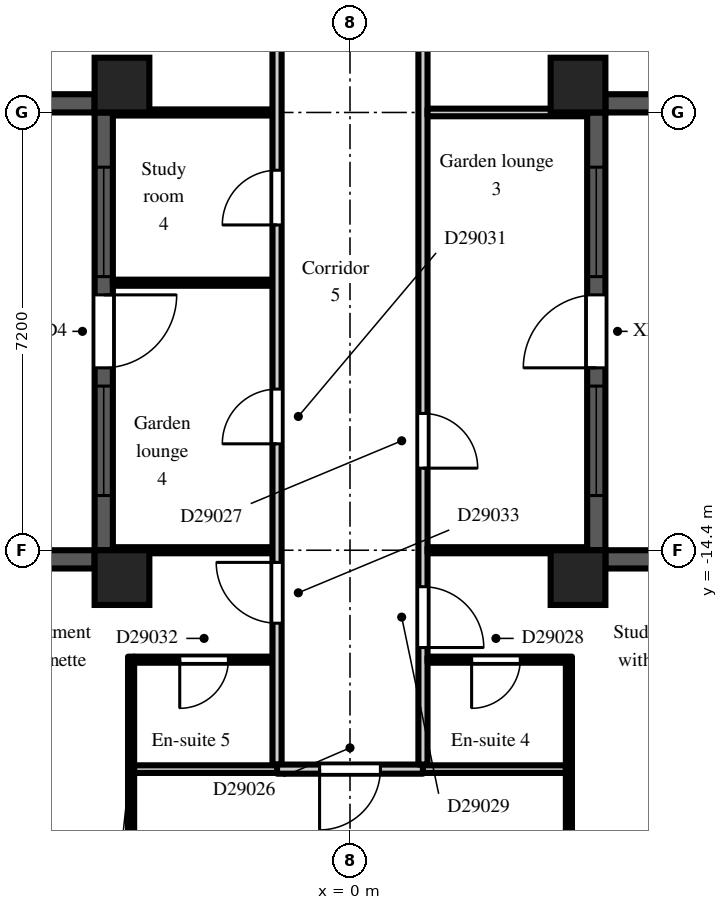
"""IFC4 building model, lengths in metres.
Left out: names, types, materials, properties, quantities, classifications, styles, units other than length and angle.
Written with IfcOpenShell. Run it as: python <this file> out.ifc"""

import sys

from ifc_helpers import new_model, si_unit, direction, frame, frame_2d, origin, origin_2d, place, context, subcontext, project, spatial, rectangle, extrude, element, fill, save


model = new_model("IFC4")
c1 = context("Model", 3, precision=1e-05, world=origin(), true_north=direction((0.0, 1.0)))
c2 = subcontext(c1, "Body", "Model", "MODEL_VIEW")
j1 = project(units=[si_unit("LENGTHUNIT", "METRE"), si_unit("PLANEANGLEUNIT", "RADIAN")], contexts=[c1])
p1 = place(None, origin())
s1 = spatial("IfcSite", under=j1, at=p1, CompositionType="ELEMENT")
p2 = place(p1, origin())
s2 = spatial("IfcBuilding", under=s1, at=p2, CompositionType="ELEMENT")
p3 = place(p2, frame((0.0, 0.0, 201.9)))
s3 = spatial("IfcBuildingStorey", under=s2, at=p3, CompositionType="ELEMENT", Elevation=201.9)
for number, where, z_axis, x_axis in (
    (1, (-3.75, -14.85, 0.0), (0.0, 0.0, 1.0), (1.0, 0.0, 0.0)),
    (2, (-3.75, -6.75, 0.0), (0.0, 0.0, 1.0), (1.0, 0.0, 0.0)),
    (3, (3.75, -14.85, 0.0), (0.0, 0.0, 1.0), (1.0, 0.0, 0.0)),
    (4, (3.75, -6.75, 0.0), (0.0, 0.0, 1.0), (1.0, 0.0, 0.0)),
):
    element("IfcColumn", number, at=place(p3, frame(where, z_axis=z_axis, x_axis=x_axis)), inside=s3, PredefinedType="COLUMN", context=c2, shape_type="SweptSolid", body=[
        extrude(rectangle(XDim=0.9, YDim=0.9, at=origin_2d()), origin(), (0.0, 0.0, 1.0), 3.0),
    ])
p4 = place(p3, frame((-7.2, -7.05, 0.0), z_axis=(0.0, 0.0, 1.0), x_axis=(1.0, 0.0, 0.0)))
e5 = element("IfcWall", 5, at=p4, inside=s3, PredefinedType="SOLIDWALL", context=c2, shape_type="SweptSolid", body=[
    extrude(rectangle(XDim=3.0, YDim=0.3, at=frame_2d((1.5, 0.0))), origin(), (0.0, 0.0, 1.0), 2.3),
])
p5 = place(p3, frame((-4.05, -7.2, 0.0), z_axis=(0.0, 0.0, 1.0), x_axis=(0.0, -1.0, 0.0)))
e6 = element("IfcWall", 6, at=p5, inside=s3, PredefinedType="SOLIDWALL", context=c2, shape_type="SweptSolid", body=[
    extrude(rectangle(XDim=7.2, YDim=0.3, at=frame_2d((3.6, 0.0))), origin(), (0.0, 0.0, 1.0), 2.3),
])
p6 = place(p5, frame((3.0, 0.0, 0.0)))
e7 = element("IfcOpeningElement", 7, at=p6, cuts=e6, PredefinedType="OPENING", context=c2, shape_type="SweptSolid", body=[
    extrude(rectangle(XDim=1.2, YDim=2.05, at=frame_2d((0.6, 1.025))), frame((0.0, 0.16, 0.0), z_axis=(0.0, -1.0, 0.0), x_axis=(1.0, 0.0, 0.0)), (0.0, 0.0, 1.0), 0.32),
])
p7 = place(p5, frame((0.9, 0.0, 0.2)))
e8 = element("IfcOpeningElement", 8, at=p7, cuts=e6, PredefinedType="OPENING", context=c2, shape_type="SweptSolid", body=[
    extrude(rectangle(XDim=1.8, YDim=1.85, at=frame_2d((0.9, 0.925))), frame((0.0, 0.16, 0.0), z_axis=(0.0, -1.0, 0.0), x_axis=(1.0, 0.0, 0.0)), (0.0, 0.0, 1.0), 0.32),
])
p8 = place(p5, frame((4.5, 0.0, 0.2)))
e9 = element("IfcOpeningElement", 9, at=p8, cuts=e6, PredefinedType="OPENING", context=c2, shape_type="SweptSolid", body=[
    extrude(rectangle(XDim=1.8, YDim=1.85, at=frame_2d((0.9, 0.925))), frame((0.0, 0.16, 0.0), z_axis=(0.0, -1.0, 0.0), x_axis=(1.0, 0.0, 0.0)), (0.0, 0.0, 1.0), 0.32),
])
for number, where, z_axis, x_axis in (
    (10, (-4.2, -14.55, 0.0), (0.0, 0.0, 1.0), (-1.0, 0.0, 0.0)),
    (11, (6.3, -14.55, 0.0), (0.0, 0.0, 1.0), (-1.0, 0.0, 0.0)),
):
    element("IfcWall", number, at=place(p3, frame(where, z_axis=z_axis, x_axis=x_axis)), inside=s3, PredefinedType="SOLIDWALL", context=c2, shape_type="SweptSolid", body=[
        extrude(rectangle(XDim=2.1, YDim=0.3, at=frame_2d((1.05, 0.0))), origin(), (0.0, 0.0, 1.0), 2.3),
    ])
p9 = place(p3, frame((4.05, -14.4, 0.0), z_axis=(0.0, 0.0, 1.0), x_axis=(0.0, 1.0, 0.0)))
e12 = element("IfcWall", 12, at=p9, inside=s3, PredefinedType="SOLIDWALL", context=c2, shape_type="SweptSolid", body=[
    extrude(rectangle(XDim=7.2, YDim=0.3, at=frame_2d((3.6, 0.0))), origin(), (0.0, 0.0, 1.0), 2.3),
])
p10 = place(p9, frame((3.0, 0.0, 0.0)))
e13 = element("IfcOpeningElement", 13, at=p10, cuts=e12, PredefinedType="OPENING", context=c2, shape_type="SweptSolid", body=[
    extrude(rectangle(XDim=1.2, YDim=2.05, at=frame_2d((0.6, 1.025))), frame((0.0, 0.16, 0.0), z_axis=(0.0, -1.0, 0.0), x_axis=(1.0, 0.0, 0.0)), (0.0, 0.0, 1.0), 0.32),
])
p11 = place(p9, frame((0.9, 0.0, 0.2)))
e14 = element("IfcOpeningElement", 14, at=p11, cuts=e12, PredefinedType="OPENING", context=c2, shape_type="SweptSolid", body=[
    extrude(rectangle(XDim=1.8, YDim=1.85, at=frame_2d((0.9, 0.925))), frame((0.0, 0.16, 0.0), z_axis=(0.0, -1.0, 0.0), x_axis=(1.0, 0.0, 0.0)), (0.0, 0.0, 1.0), 0.32),
])
p12 = place(p9, frame((4.5, 0.0, 0.2)))
e15 = element("IfcOpeningElement", 15, at=p12, cuts=e12, PredefinedType="OPENING", context=c2, shape_type="SweptSolid", body=[
    extrude(rectangle(XDim=1.8, YDim=1.85, at=frame_2d((0.9, 0.925))), frame((0.0, 0.16, 0.0), z_axis=(0.0, -1.0, 0.0), x_axis=(1.0, 0.0, 0.0)), (0.0, 0.0, 1.0), 0.32),
])
p13 = place(p3, frame((4.2, -7.05, 0.0), z_axis=(0.0, 0.0, 1.0), x_axis=(1.0, 0.0, 0.0)))
e16 = element("IfcWall", 16, at=p13, inside=s3, PredefinedType="SOLIDWALL", context=c2, shape_type="SweptSolid", body=[
    extrude(rectangle(XDim=3.0, YDim=0.3, at=frame_2d((1.5, 0.0))), origin(), (0.0, 0.0, 1.0), 2.3),
])
for number, where, z_axis, x_axis in (
    (17, (-3.9, -14.4, 0.0), (0.0, 0.0, 1.0), (1.0, 0.0, 0.0)),
    (18, (-3.9, -10.0, 0.0), (0.0, 0.0, 1.0), (1.0, 0.0, 0.0)),
    (19, (-3.9, -7.2, 0.0), (0.0, 0.0, 1.0), (1.0, 0.0, 0.0)),
):
    element("IfcWall", number, at=place(p3, frame(where, z_axis=z_axis, x_axis=x_axis)), inside=s3, PredefinedType="PARTITIONING", context=c2, shape_type="SweptSolid", body=[
        extrude(rectangle(XDim=2.625, YDim=0.1, at=frame_2d((1.312, 0.0))), origin(), (0.0, 0.0, 1.0), 2.6),
    ])
p14 = place(p3, frame((-3.6, -19.5, 0.0), z_axis=(0.0, 0.0, 1.0), x_axis=(0.0, 1.0, 0.0)))
e20 = element("IfcWall", 20, at=p14, inside=s3, PredefinedType="PARTITIONING", context=c2, shape_type="SweptSolid", body=[
    extrude(rectangle(XDim=3.35, YDim=0.1, at=frame_2d((1.675, 0.0))), origin(), (0.0, 0.0, 1.0), 2.6),
])
p15 = place(p3, frame((-3.55, -18.0, 0.0), z_axis=(0.0, 0.0, 1.0), x_axis=(1.0, 0.0, 0.0)))
e21 = element("IfcWall", 21, at=p15, inside=s3, PredefinedType="PARTITIONING", context=c2, shape_type="SweptSolid", body=[
    extrude(rectangle(XDim=2.35, YDim=0.125, at=frame_2d((1.175, 0.0))), origin(), (0.0, 0.0, 1.0), 2.6),
])
p16 = place(p3, frame((-3.55, -16.2, 0.0), z_axis=(0.0, 0.0, 1.0), x_axis=(1.0, 0.0, 0.0)))
e22 = element("IfcWall", 22, at=p16, inside=s3, PredefinedType="PARTITIONING", context=c2, shape_type="SweptSolid", body=[
    extrude(rectangle(XDim=2.275, YDim=0.1, at=frame_2d((1.138, 0.0))), origin(), (0.0, 0.0, 1.0), 2.6),
])
p17 = place(p16, frame((0.75, 0.0, 0.0)))
e23 = element("IfcOpeningElement", 23, at=p17, cuts=e22, PredefinedType="OPENING", context=c2, shape_type="SweptSolid", body=[
    extrude(rectangle(XDim=0.8, YDim=2.1, at=frame_2d((0.4, 1.05))), frame((0.0, 0.06, 0.0), z_axis=(0.0, -1.0, 0.0), x_axis=(1.0, 0.0, 0.0)), (0.0, 0.0, 1.0), 0.12),
])
p18 = place(p3, frame((-1.2, -17.925, 0.0), z_axis=(0.0, 0.0, 1.0), x_axis=(0.0, 1.0, 0.0)))
e24 = element("IfcWall", 24, at=p18, inside=s3, PredefinedType="PARTITIONING", context=c2, shape_type="SweptSolid", body=[
    extrude(rectangle(XDim=16.65, YDim=0.15, at=frame_2d((8.325, 0.0))), origin(), (0.0, 0.0, 1.0), 2.6),
])
p19 = place(p18, frame((12.175, 0.0, 0.0)))
e25 = element("IfcOpeningElement", 25, at=p19, cuts=e24, PredefinedType="OPENING", context=c2, shape_type="SweptSolid", body=[
    extrude(rectangle(XDim=0.9, YDim=2.1, at=frame_2d((0.45, 1.05))), frame((0.0, 0.085, 0.0), z_axis=(0.0, -1.0, 0.0), x_axis=(1.0, 0.0, 0.0)), (0.0, 0.0, 1.0), 0.17),
])
p20 = place(p18, frame((8.875, 0.0, 0.0)))
e26 = element("IfcOpeningElement", 26, at=p20, cuts=e24, PredefinedType="OPENING", context=c2, shape_type="SweptSolid", body=[
    extrude(rectangle(XDim=0.9, YDim=2.1, at=frame_2d((0.45, 1.05))), frame((0.0, 0.085, 0.0), z_axis=(0.0, -1.0, 0.0), x_axis=(1.0, 0.0, 0.0)), (0.0, 0.0, 1.0), 0.17),
])
p21 = place(p18, frame((5.275, 0.0, 0.0)))
e27 = element("IfcOpeningElement", 27, at=p21, cuts=e24, PredefinedType="OPENING", context=c2, shape_type="SweptSolid", body=[
    extrude(rectangle(XDim=0.9, YDim=2.1, at=frame_2d((0.45, 1.05))), frame((0.0, 0.085, 0.0), z_axis=(0.0, -1.0, 0.0), x_axis=(1.0, 0.0, 0.0)), (0.0, 0.0, 1.0), 0.17),
])
p22 = place(p18, frame((2.325, 0.0, 0.0)))
e28 = element("IfcOpeningElement", 28, at=p22, cuts=e24, PredefinedType="OPENING", context=c2, shape_type="SweptSolid", body=[
    extrude(rectangle(XDim=1.0, YDim=2.1, at=frame_2d((0.5, 1.05))), frame((0.0, 0.085, 0.0), z_axis=(0.0, -1.0, 0.0), x_axis=(1.0, 0.0, 0.0)), (0.0, 0.0, 1.0), 0.17),
])
p23 = place(p3, frame((-1.2, -18.0, 0.0), z_axis=(0.0, 0.0, 1.0), x_axis=(1.0, 0.0, 0.0)))
e29 = element("IfcWall", 29, at=p23, inside=s3, PredefinedType="PARTITIONING", context=c2, shape_type="SweptSolid", body=[
    extrude(rectangle(XDim=2.4, YDim=0.15, at=frame_2d((1.2, 0.0))), origin(), (0.0, 0.0, 1.0), 2.6),
])
p24 = place(p23, frame((0.7, 0.0, 0.0)))
e30 = element("IfcOpeningElement", 30, at=p24, cuts=e29, PredefinedType="OPENING", context=c2, shape_type="SweptSolid", body=[
    extrude(rectangle(XDim=1.0, YDim=2.1, at=frame_2d((0.5, 1.05))), frame((0.0, 0.085, 0.0), z_axis=(0.0, -1.0, 0.0), x_axis=(1.0, 0.0, 0.0)), (0.0, 0.0, 1.0), 0.17),
])
p25 = place(p3, frame((1.2, -17.925, 0.0), z_axis=(0.0, 0.0, 1.0), x_axis=(0.0, 1.0, 0.0)))
e31 = element("IfcWall", 31, at=p25, inside=s3, PredefinedType="PARTITIONING", context=c2, shape_type="SweptSolid", body=[
    extrude(rectangle(XDim=16.8, YDim=0.15, at=frame_2d((8.4, 0.0))), origin(), (0.0, 0.0, 1.0), 2.6),
])
p26 = place(p25, frame((15.075, 0.0, 0.0)))
e32 = element("IfcOpeningElement", 32, at=p26, cuts=e31, PredefinedType="OPENING", context=c2, shape_type="SweptSolid", body=[
    extrude(rectangle(XDim=0.9, YDim=2.1, at=frame_2d((0.45, 1.05))), frame((0.0, 0.085, 0.0), z_axis=(0.0, -1.0, 0.0), x_axis=(1.0, 0.0, 0.0)), (0.0, 0.0, 1.0), 0.17),
])
p27 = place(p25, frame((12.075, 0.0, 0.0)))
e33 = element("IfcOpeningElement", 33, at=p27, cuts=e31, PredefinedType="OPENING", context=c2, shape_type="SweptSolid", body=[
    extrude(rectangle(XDim=0.9, YDim=2.1, at=frame_2d((0.45, 1.05))), frame((0.0, 0.085, 0.0), z_axis=(0.0, -1.0, 0.0), x_axis=(1.0, 0.0, 0.0)), (0.0, 0.0, 1.0), 0.17),
])
p28 = place(p25, frame((4.875, 0.0, 0.0)))
e34 = element("IfcOpeningElement", 34, at=p28, cuts=e31, PredefinedType="OPENING", context=c2, shape_type="SweptSolid", body=[
    extrude(rectangle(XDim=0.9, YDim=2.1, at=frame_2d((0.45, 1.05))), frame((0.0, 0.085, 0.0), z_axis=(0.0, -1.0, 0.0), x_axis=(1.0, 0.0, 0.0)), (0.0, 0.0, 1.0), 0.17),
])
p29 = place(p25, frame((1.925, 0.0, 0.0)))
e35 = element("IfcOpeningElement", 35, at=p29, cuts=e31, PredefinedType="OPENING", context=c2, shape_type="SweptSolid", body=[
    extrude(rectangle(XDim=1.0, YDim=2.1, at=frame_2d((0.5, 1.05))), frame((0.0, 0.085, 0.0), z_axis=(0.0, -1.0, 0.0), x_axis=(1.0, 0.0, 0.0)), (0.0, 0.0, 1.0), 0.17),
])
p30 = place(p3, frame((1.2, -18.0, 0.0), z_axis=(0.0, 0.0, 1.0), x_axis=(1.0, 0.0, 0.0)))
e36 = element("IfcWall", 36, at=p30, inside=s3, PredefinedType="PARTITIONING", context=c2, shape_type="SweptSolid", body=[
    extrude(rectangle(XDim=2.35, YDim=0.125, at=frame_2d((1.175, 0.0))), origin(), (0.0, 0.0, 1.0), 2.6),
])
p31 = place(p3, frame((1.275, -16.2, 0.0), z_axis=(0.0, 0.0, 1.0), x_axis=(1.0, 0.0, 0.0)))
e37 = element("IfcWall", 37, at=p31, inside=s3, PredefinedType="PARTITIONING", context=c2, shape_type="SweptSolid", body=[
    extrude(rectangle(XDim=2.375, YDim=0.1, at=frame_2d((1.188, 0.0))), origin(), (0.0, 0.0, 1.0), 2.6),
])
p32 = place(p31, frame((0.725, 0.0, 0.0)))
e38 = element("IfcOpeningElement", 38, at=p32, cuts=e37, PredefinedType="OPENING", context=c2, shape_type="SweptSolid", body=[
    extrude(rectangle(XDim=0.8, YDim=2.1, at=frame_2d((0.4, 1.05))), frame((0.0, 0.06, 0.0), z_axis=(0.0, -1.0, 0.0), x_axis=(1.0, 0.0, 0.0)), (0.0, 0.0, 1.0), 0.12),
])
p33 = place(p3, frame((1.275, -14.4, 0.0), z_axis=(0.0, 0.0, 1.0), x_axis=(1.0, 0.0, 0.0)))
e39 = element("IfcWall", 39, at=p33, inside=s3, PredefinedType="PARTITIONING", context=c2, shape_type="SweptSolid", body=[
    extrude(rectangle(XDim=2.625, YDim=0.1, at=frame_2d((1.312, 0.0))), origin(), (0.0, 0.0, 1.0), 2.6),
])
p34 = place(p3, frame((1.275, -7.2, 0.0), z_axis=(0.0, 0.0, 1.0), x_axis=(1.0, 0.0, 0.0)))
e40 = element("IfcWall", 40, at=p34, inside=s3, PredefinedType="PARTITIONING", context=c2, shape_type="SweptSolid", body=[
    extrude(rectangle(XDim=2.625, YDim=0.125, at=frame_2d((1.312, 0.0))), origin(), (0.0, 0.0, 1.0), 2.6),
])
p35 = place(p3, frame((3.6, -19.5, 0.0), z_axis=(0.0, 0.0, 1.0), x_axis=(0.0, 1.0, 0.0)))
e41 = element("IfcWall", 41, at=p35, inside=s3, PredefinedType="PARTITIONING", context=c2, shape_type="SweptSolid", body=[
    extrude(rectangle(XDim=3.25, YDim=0.1, at=frame_2d((1.625, 0.0))), origin(), (0.0, 0.0, 1.0), 2.6),
])
p36 = place(p6, origin())
e42 = element("IfcDoor", 42, at=p36, inside=s3, OperationType="SINGLE_SWING_LEFT", PredefinedType="DOOR", context=c2, shape_type="SweptSolid", body=[
    extrude(rectangle(XDim=1.2, YDim=2.05, at=frame_2d((0.6, 1.025))), frame((0.0, 0.025, 0.0), z_axis=(0.0, -1.0, 0.0), x_axis=(1.0, 0.0, 0.0)), (0.0, 0.0, 1.0), 0.05),
])
fill(e7, e42)
p37 = place(p7, origin())
e43 = element("IfcWindow", 43, at=p37, inside=s3, PartitioningType="SINGLE_PANEL", PredefinedType="WINDOW", context=c2, shape_type="SweptSolid", body=[
    extrude(rectangle(XDim=1.8, YDim=1.85, at=frame_2d((0.9, 0.925))), frame((0.0, 0.03, 0.0), z_axis=(0.0, -1.0, 0.0), x_axis=(1.0, 0.0, 0.0)), (0.0, 0.0, 1.0), 0.06),
])
fill(e8, e43)
p38 = place(p8, origin())
e44 = element("IfcWindow", 44, at=p38, inside=s3, PartitioningType="SINGLE_PANEL", PredefinedType="WINDOW", context=c2, shape_type="SweptSolid", body=[
    extrude(rectangle(XDim=1.8, YDim=1.85, at=frame_2d((0.9, 0.925))), frame((0.0, 0.03, 0.0), z_axis=(0.0, -1.0, 0.0), x_axis=(1.0, 0.0, 0.0)), (0.0, 0.0, 1.0), 0.06),
])
fill(e9, e44)
p39 = place(p10, origin())
e45 = element("IfcDoor", 45, at=p39, inside=s3, OperationType="SINGLE_SWING_LEFT", PredefinedType="DOOR", context=c2, shape_type="SweptSolid", body=[
    extrude(rectangle(XDim=1.2, YDim=2.05, at=frame_2d((0.6, 1.025))), frame((0.0, 0.025, 0.0), z_axis=(0.0, -1.0, 0.0), x_axis=(1.0, 0.0, 0.0)), (0.0, 0.0, 1.0), 0.05),
])
fill(e13, e45)
p40 = place(p11, origin())
e46 = element("IfcWindow", 46, at=p40, inside=s3, PartitioningType="SINGLE_PANEL", PredefinedType="WINDOW", context=c2, shape_type="SweptSolid", body=[
    extrude(rectangle(XDim=1.8, YDim=1.85, at=frame_2d((0.9, 0.925))), frame((0.0, 0.03, 0.0), z_axis=(0.0, -1.0, 0.0), x_axis=(1.0, 0.0, 0.0)), (0.0, 0.0, 1.0), 0.06),
])
fill(e14, e46)
p41 = place(p12, origin())
e47 = element("IfcWindow", 47, at=p41, inside=s3, PartitioningType="SINGLE_PANEL", PredefinedType="WINDOW", context=c2, shape_type="SweptSolid", body=[
    extrude(rectangle(XDim=1.8, YDim=1.85, at=frame_2d((0.9, 0.925))), frame((0.0, 0.03, 0.0), z_axis=(0.0, -1.0, 0.0), x_axis=(1.0, 0.0, 0.0)), (0.0, 0.0, 1.0), 0.06),
])
fill(e15, e47)
p42 = place(p24, frame((1.0, 0.0, 0.0), z_axis=(0.0, 0.0, 1.0), x_axis=(-1.0, 0.0, 0.0)))
e48 = element("IfcDoor", 48, at=p42, inside=s3, OperationType="SINGLE_SWING_RIGHT", PredefinedType="DOOR", context=c2, shape_type="SweptSolid", body=[
    extrude(rectangle(XDim=1.0, YDim=2.1, at=frame_2d((0.5, 1.05))), frame((0.0, 0.025, 0.0), z_axis=(0.0, -1.0, 0.0), x_axis=(1.0, 0.0, 0.0)), (0.0, 0.0, 1.0), 0.05),
])
fill(e30, e48)
p43 = place(p28, frame((0.9, 0.0, 0.0), z_axis=(0.0, 0.0, 1.0), x_axis=(-1.0, 0.0, 0.0)))
e49 = element("IfcDoor", 49, at=p43, inside=s3, OperationType="SINGLE_SWING_RIGHT", PredefinedType="DOOR", context=c2, shape_type="SweptSolid", body=[
    extrude(rectangle(XDim=0.9, YDim=2.1, at=frame_2d((0.45, 1.05))), frame((0.0, 0.025, 0.0), z_axis=(0.0, -1.0, 0.0), x_axis=(1.0, 0.0, 0.0)), (0.0, 0.0, 1.0), 0.05),
])
fill(e34, e49)
p44 = place(p32, frame((0.8, 0.0, 0.0), z_axis=(0.0, 0.0, 1.0), x_axis=(-1.0, 0.0, 0.0)))
e50 = element("IfcDoor", 50, at=p44, inside=s3, OperationType="SINGLE_SWING_RIGHT", PredefinedType="DOOR", context=c2, shape_type="SweptSolid", body=[
    extrude(rectangle(XDim=0.8, YDim=2.1, at=frame_2d((0.4, 1.05))), frame((0.0, 0.025, 0.0), z_axis=(0.0, -1.0, 0.0), x_axis=(1.0, 0.0, 0.0)), (0.0, 0.0, 1.0), 0.05),
])
fill(e38, e50)
p45 = place(p29, frame((1.0, 0.0, 0.0), z_axis=(0.0, 0.0, 1.0), x_axis=(-1.0, 0.0, 0.0)))
e51 = element("IfcDoor", 51, at=p45, inside=s3, OperationType="SINGLE_SWING_RIGHT", PredefinedType="DOOR", context=c2, shape_type="SweptSolid", body=[
    extrude(rectangle(XDim=1.0, YDim=2.1, at=frame_2d((0.5, 1.05))), frame((0.0, 0.025, 0.0), z_axis=(0.0, -1.0, 0.0), x_axis=(1.0, 0.0, 0.0)), (0.0, 0.0, 1.0), 0.05),
])
fill(e35, e51)
p46 = place(p20, origin())
e52 = element("IfcDoor", 52, at=p46, inside=s3, OperationType="SINGLE_SWING_LEFT", PredefinedType="DOOR", context=c2, shape_type="SweptSolid", body=[
    extrude(rectangle(XDim=0.9, YDim=2.1, at=frame_2d((0.45, 1.05))), frame((0.0, 0.025, 0.0), z_axis=(0.0, -1.0, 0.0), x_axis=(1.0, 0.0, 0.0)), (0.0, 0.0, 1.0), 0.05),
])
fill(e26, e52)
p47 = place(p21, origin())
e53 = element("IfcDoor", 53, at=p47, inside=s3, OperationType="SINGLE_SWING_LEFT", PredefinedType="DOOR", context=c2, shape_type="SweptSolid", body=[
    extrude(rectangle(XDim=0.9, YDim=2.1, at=frame_2d((0.45, 1.05))), frame((0.0, 0.025, 0.0), z_axis=(0.0, -1.0, 0.0), x_axis=(1.0, 0.0, 0.0)), (0.0, 0.0, 1.0), 0.05),
])
fill(e27, e53)
p48 = place(p17, frame((0.8, 0.0, 0.0), z_axis=(0.0, 0.0, 1.0), x_axis=(-1.0, 0.0, 0.0)))
e54 = element("IfcDoor", 54, at=p48, inside=s3, OperationType="SINGLE_SWING_RIGHT", PredefinedType="DOOR", context=c2, shape_type="SweptSolid", body=[
    extrude(rectangle(XDim=0.8, YDim=2.1, at=frame_2d((0.4, 1.05))), frame((0.0, 0.025, 0.0), z_axis=(0.0, -1.0, 0.0), x_axis=(1.0, 0.0, 0.0)), (0.0, 0.0, 1.0), 0.05),
])
fill(e23, e54)
p49 = place(p22, origin())
e55 = element("IfcDoor", 55, at=p49, inside=s3, OperationType="SINGLE_SWING_RIGHT", PredefinedType="DOOR", context=c2, shape_type="SweptSolid", body=[
    extrude(rectangle(XDim=1.0, YDim=2.1, at=frame_2d((0.5, 1.05))), frame((0.0, 0.025, 0.0), z_axis=(0.0, -1.0, 0.0), x_axis=(1.0, 0.0, 0.0)), (0.0, 0.0, 1.0), 0.05),
])
fill(e28, e55)
save(model, sys.argv[1])
